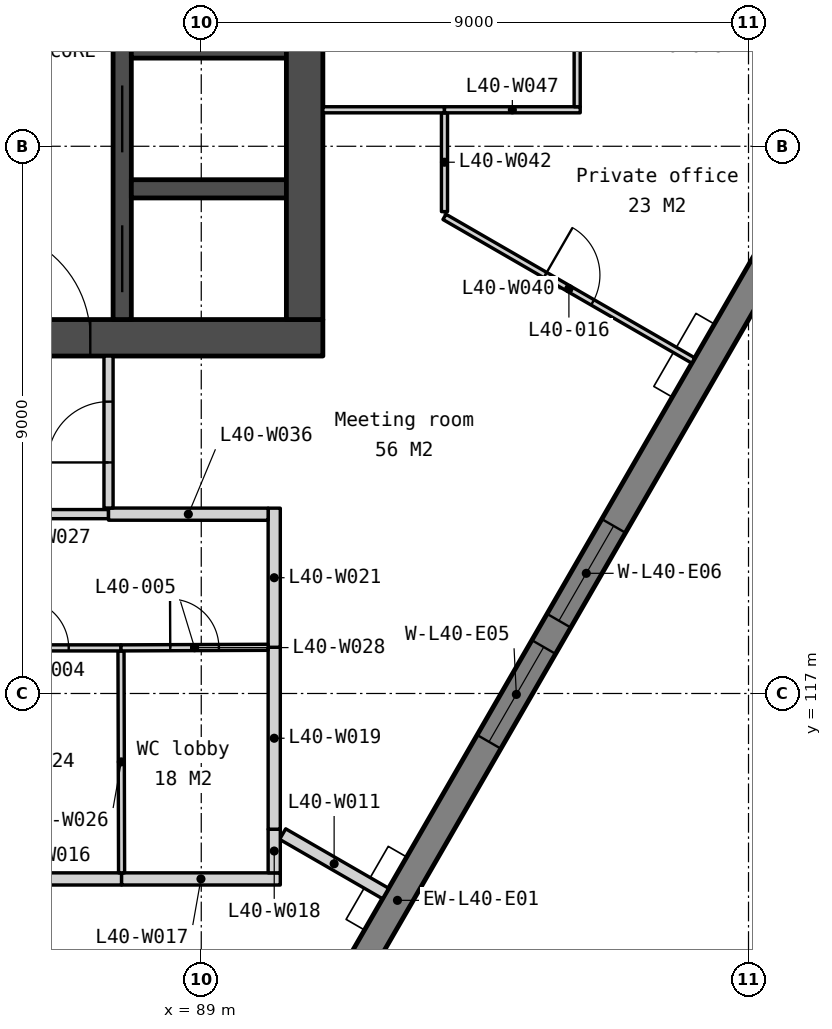
"""IFC4 building model, lengths in metres.
Left out: names, types, materials, properties, quantities, classifications, styles, units other than length and angle.
Written with IfcOpenShell. Run it as: python <this file> out.ifc"""

import sys

from ifc_helpers import new_model, si_unit, direction, frame, frame_2d, origin, place, context, subcontext, project, spatial, polyline, rectangle, outline, extrude, element, fill, save


model = new_model("IFC4")
c1 = context("Model", 3, precision=1e-05, world=origin(), true_north=direction((0.0, 1.0)))
c2 = subcontext(c1, "Body", "Model", "MODEL_VIEW")
j1 = project(units=[si_unit("LENGTHUNIT", "METRE"), si_unit("PLANEANGLEUNIT", "RADIAN")], contexts=[c1])
p1 = place(None, origin())
s1 = spatial("IfcSite", under=j1, at=p1, CompositionType="ELEMENT")
p2 = place(p1, origin())
s2 = spatial("IfcBuilding", under=s1, at=p2, CompositionType="ELEMENT")
p3 = place(p2, frame((0.0, 0.0, 159.8)))
s3 = spatial("IfcBuildingStorey", under=s2, at=p3, CompositionType="ELEMENT", Elevation=159.8)
p4 = place(p3, frame((69.0, 122.85, 0.0), z_axis=(0.0, 0.0, 1.0), x_axis=(1.0, 0.0, 0.0)))
e1 = element("IfcWall", 1, at=p4, inside=s3, PredefinedType="SOLIDWALL", context=c2, shape_type="SweptSolid", body=[
    extrude(rectangle(XDim=22.0, YDim=0.6, at=frame_2d((11.0, 0.0))), origin(), (0.0, 0.0, 1.0), 3.75),
])
p5 = place(p4, frame((16.375, 0.0, 0.0)))
e2 = element("IfcOpeningElement", 2, at=p5, cuts=e1, PredefinedType="OPENING", context=c2, shape_type="SweptSolid", body=[
    extrude(rectangle(XDim=1.8, YDim=2.1, at=frame_2d((0.9, 1.05))), frame((0.0, 0.31, 0.0), z_axis=(0.0, -1.0, 0.0), x_axis=(1.0, 0.0, 0.0)), (0.0, 0.0, 1.0), 0.62),
])
p6 = place(p4, frame((3.825, 0.0, 0.0)))
e3 = element("IfcOpeningElement", 3, at=p6, cuts=e1, PredefinedType="OPENING", context=c2, shape_type="SweptSolid", body=[
    extrude(rectangle(XDim=1.8, YDim=2.1, at=frame_2d((0.9, 1.05))), frame((0.0, 0.31, 0.0), z_axis=(0.0, -1.0, 0.0), x_axis=(1.0, 0.0, 0.0)), (0.0, 0.0, 1.0), 0.62),
])
p7 = place(p4, frame((12.85, 0.0, 0.0)))
e4 = element("IfcOpeningElement", 4, at=p7, cuts=e1, PredefinedType="OPENING", context=c2, shape_type="SweptSolid", body=[
    extrude(rectangle(XDim=1.5, YDim=2.1, at=frame_2d((0.75, 1.05))), frame((0.0, 0.31, 0.0), z_axis=(0.0, -1.0, 0.0), x_axis=(1.0, 0.0, 0.0)), (0.0, 0.0, 1.0), 0.62),
])
p8 = place(p3, frame((87.7, 133.95, 0.0), z_axis=(0.0, 0.0, 1.0), x_axis=(0.0, -1.0, 0.0)))
e5 = element("IfcWall", 5, at=p8, inside=s3, PredefinedType="SOLIDWALL", context=c2, shape_type="SweptSolid", body=[
    extrude(rectangle(XDim=10.8, YDim=0.3, at=frame_2d((5.4, 0.0))), origin(), (0.0, 0.0, 1.0), 3.75),
])
p9 = place(p8, frame((6.95, 0.0, 0.0)))
e6 = element("IfcOpeningElement", 6, at=p9, cuts=e5, PredefinedType="OPENING", context=c2, shape_type="SweptSolid", body=[
    extrude(rectangle(XDim=1.1, YDim=2.1, at=frame_2d((0.55, 1.05))), frame((0.0, 0.16, 0.0), z_axis=(0.0, -1.0, 0.0), x_axis=(1.0, 0.0, 0.0)), (0.0, 0.0, 1.0), 0.32),
])
p10 = place(p8, frame((5.1, 0.0, 0.0)))
e7 = element("IfcOpeningElement", 7, at=p10, cuts=e5, PredefinedType="OPENING", context=c2, shape_type="SweptSolid", body=[
    extrude(rectangle(XDim=1.0, YDim=2.1, at=frame_2d((0.5, 1.05))), frame((0.0, 0.16, 0.0), z_axis=(0.0, -1.0, 0.0), x_axis=(1.0, 0.0, 0.0)), (0.0, 0.0, 1.0), 0.32),
])
p11 = place(p8, frame((9.25, 0.0, 0.0)))
e8 = element("IfcOpeningElement", 8, at=p11, cuts=e5, PredefinedType="OPENING", context=c2, shape_type="SweptSolid", body=[
    extrude(rectangle(XDim=1.1, YDim=2.1, at=frame_2d((0.55, 1.05))), frame((0.0, 0.16, 0.0), z_axis=(0.0, -1.0, 0.0), x_axis=(1.0, 0.0, 0.0)), (0.0, 0.0, 1.0), 0.32),
])
for number, where, z_axis, x_axis in (
    (9, (87.85, 127.6, 0.0), (0.0, 0.0, 1.0), (1.0, 0.0, 0.0)),
    (10, (87.85, 125.3, 0.0), (0.0, 0.0, 1.0), (1.0, 0.0, 0.0)),
):
    element("IfcWall", number, at=place(p3, frame(where, z_axis=z_axis, x_axis=x_axis)), inside=s3, PredefinedType="SOLIDWALL", context=c2, shape_type="SweptSolid", body=[
        extrude(rectangle(XDim=2.55, YDim=0.3, at=frame_2d((1.275, 0.0))), origin(), (0.0, 0.0, 1.0), 3.75),
    ])
p12 = place(p3, frame((90.7, 133.95, 0.0), z_axis=(0.0, 0.0, 1.0), x_axis=(0.0, -1.0, 0.0)))
e11 = element("IfcWall", 11, at=p12, inside=s3, PredefinedType="SOLIDWALL", context=c2, shape_type="SweptSolid", body=[
    extrude(rectangle(XDim=10.8, YDim=0.6, at=frame_2d((5.4, 0.0))), origin(), (0.0, 0.0, 1.0), 3.75),
])
p13 = place(p3, frame((82.105, 96.067, -0.15), z_axis=(0.0, 0.0, 1.0), x_axis=(0.499997369791, 0.866026922331, 0.0)))
e12 = element("IfcWall", 12, at=p13, inside=s3, PredefinedType="SOLIDWALL", context=c2, shape_type="SweptSolid", body=[
    extrude(outline(polyline([(40.486, 0.0), (40.486, 3.9), (0.0, 3.9), (0.0, 0.0), (40.486, 0.0)])), frame((0.0, 0.225, 0.0), z_axis=(0.0, -1.0, 0.0), x_axis=(1.0, 0.0, 0.0)), (0.0, 0.0, 1.0), 0.45),
])
p14 = place(p13, frame((3.011, 0.0, 0.95)))
e13 = element("IfcOpeningElement", 13, at=p14, cuts=e12, PredefinedType="OPENING", context=c2, shape_type="SweptSolid", body=[
    extrude(rectangle(XDim=1.8, YDim=2.2, at=frame_2d((0.9, 1.1))), frame((0.0, 0.235, 0.0), z_axis=(0.0, -1.0, 0.0), x_axis=(1.0, 0.0, 0.0)), (0.0, 0.0, 1.0), 0.47),
])
p15 = place(p13, frame((5.311, 0.0, 0.95)))
e14 = element("IfcOpeningElement", 14, at=p15, cuts=e12, PredefinedType="OPENING", context=c2, shape_type="SweptSolid", body=[
    extrude(rectangle(XDim=1.8, YDim=2.2, at=frame_2d((0.9, 1.1))), frame((0.0, 0.235, 0.0), z_axis=(0.0, -1.0, 0.0), x_axis=(1.0, 0.0, 0.0)), (0.0, 0.0, 1.0), 0.47),
])
p16 = place(p13, frame((13.132, 0.0, 0.95)))
e15 = element("IfcOpeningElement", 15, at=p16, cuts=e12, PredefinedType="OPENING", context=c2, shape_type="SweptSolid", body=[
    extrude(rectangle(XDim=1.8, YDim=2.2, at=frame_2d((0.9, 1.1))), frame((0.0, 0.235, 0.0), z_axis=(0.0, -1.0, 0.0), x_axis=(1.0, 0.0, 0.0)), (0.0, 0.0, 1.0), 0.47),
])
p17 = place(p13, frame((15.432, 0.0, 0.95)))
e16 = element("IfcOpeningElement", 16, at=p17, cuts=e12, PredefinedType="OPENING", context=c2, shape_type="SweptSolid", body=[
    extrude(rectangle(XDim=1.8, YDim=2.2, at=frame_2d((0.9, 1.1))), frame((0.0, 0.235, 0.0), z_axis=(0.0, -1.0, 0.0), x_axis=(1.0, 0.0, 0.0)), (0.0, 0.0, 1.0), 0.47),
])
p18 = place(p13, frame((23.254, 0.0, 0.95)))
e17 = element("IfcOpeningElement", 17, at=p18, cuts=e12, PredefinedType="OPENING", context=c2, shape_type="SweptSolid", body=[
    extrude(rectangle(XDim=1.8, YDim=2.2, at=frame_2d((0.9, 1.1))), frame((0.0, 0.235, 0.0), z_axis=(0.0, -1.0, 0.0), x_axis=(1.0, 0.0, 0.0)), (0.0, 0.0, 1.0), 0.47),
])
p19 = place(p13, frame((25.554, 0.0, 0.95)))
e18 = element("IfcOpeningElement", 18, at=p19, cuts=e12, PredefinedType="OPENING", context=c2, shape_type="SweptSolid", body=[
    extrude(rectangle(XDim=1.8, YDim=2.2, at=frame_2d((0.9, 1.1))), frame((0.0, 0.235, 0.0), z_axis=(0.0, -1.0, 0.0), x_axis=(1.0, 0.0, 0.0)), (0.0, 0.0, 1.0), 0.47),
])
p20 = place(p13, frame((33.375, 0.0, 0.95)))
e19 = element("IfcOpeningElement", 19, at=p20, cuts=e12, PredefinedType="OPENING", context=c2, shape_type="SweptSolid", body=[
    extrude(rectangle(XDim=1.8, YDim=2.2, at=frame_2d((0.9, 1.1))), frame((0.0, 0.235, 0.0), z_axis=(0.0, -1.0, 0.0), x_axis=(1.0, 0.0, 0.0)), (0.0, 0.0, 1.0), 0.47),
])
p21 = place(p13, frame((35.675, 0.0, 0.95)))
e20 = element("IfcOpeningElement", 20, at=p21, cuts=e12, PredefinedType="OPENING", context=c2, shape_type="SweptSolid", body=[
    extrude(rectangle(XDim=1.8, YDim=2.2, at=frame_2d((0.9, 1.1))), frame((0.0, 0.235, 0.0), z_axis=(0.0, -1.0, 0.0), x_axis=(1.0, 0.0, 0.0)), (0.0, 0.0, 1.0), 0.47),
])
p22 = place(p3, frame((82.66, 113.278, 0.0), z_axis=(0.0, 0.0, 1.0), x_axis=(0.866013180616, -0.500021170551, 0.0)))
e21 = element("IfcWall", 21, at=p22, inside=s3, PredefinedType="PARTITIONING", context=c2, shape_type="SweptSolid", body=[
    extrude(rectangle(XDim=7.9, YDim=0.1, at=frame_2d((3.95, 0.0))), origin(), (0.0, 0.0, 1.0), 3.75),
])
p23 = place(p22, frame((3.5, 0.0, 0.0)))
e22 = element("IfcOpeningElement", 22, at=p23, cuts=e21, PredefinedType="OPENING", context=c2, shape_type="SweptSolid", body=[
    extrude(rectangle(XDim=0.9, YDim=2.1, at=frame_2d((0.45, 1.05))), frame((0.0, 0.06, 0.0), z_axis=(0.0, -1.0, 0.0), x_axis=(1.0, 0.0, 0.0)), (0.0, 0.0, 1.0), 0.12),
])
p24 = place(p3, frame((90.339, 114.688, 0.0), z_axis=(0.0, 0.0, 1.0), x_axis=(0.866021300503, -0.500007107024, 0.0)))
e23 = element("IfcWall", 23, at=p24, inside=s3, PredefinedType="PARTITIONING", context=c2, shape_type="SweptSolid", body=[
    extrude(rectangle(XDim=1.955, YDim=0.2, at=frame_2d((0.978, 0.0))), origin(), (0.0, 0.0, 1.0), 3.75),
])
p25 = place(p3, frame((85.15, 113.95, 0.0), z_axis=(0.0, 0.0, 1.0), x_axis=(1.0, 0.0, 0.0)))
e24 = element("IfcWall", 24, at=p25, inside=s3, PredefinedType="PARTITIONING", context=c2, shape_type="SweptSolid", body=[
    extrude(rectangle(XDim=2.54, YDim=0.2, at=frame_2d((1.27, 0.0))), origin(), (0.0, 0.0, 1.0), 3.75),
])
p26 = place(p3, frame((87.69, 113.95, 0.0), z_axis=(0.0, 0.0, 1.0), x_axis=(1.0, 0.0, 0.0)))
e25 = element("IfcWall", 25, at=p26, inside=s3, PredefinedType="PARTITIONING", context=c2, shape_type="SweptSolid", body=[
    extrude(rectangle(XDim=2.61, YDim=0.2, at=frame_2d((1.305, 0.0))), origin(), (0.0, 0.0, 1.0), 3.75),
])
p27 = place(p3, frame((90.2, 114.05, 0.0), z_axis=(0.0, 0.0, 1.0), x_axis=(0.0, 1.0, 0.0)))
e26 = element("IfcWall", 26, at=p27, inside=s3, PredefinedType="PARTITIONING", context=c2, shape_type="SweptSolid", body=[
    extrude(rectangle(XDim=0.718, YDim=0.2, at=frame_2d((0.359, 0.0))), origin(), (0.0, 0.0, 1.0), 3.75),
])
p28 = place(p3, frame((90.2, 114.768, 0.0), z_axis=(0.0, 0.0, 1.0), x_axis=(0.0, 1.0, 0.0)))
e27 = element("IfcWall", 27, at=p28, inside=s3, PredefinedType="PARTITIONING", context=c2, shape_type="SweptSolid", body=[
    extrude(rectangle(XDim=2.992, YDim=0.2, at=frame_2d((1.496, 0.0))), origin(), (0.0, 0.0, 1.0), 3.75),
])
p29 = place(p3, frame((90.2, 117.76, 0.0), z_axis=(0.0, 0.0, 1.0), x_axis=(0.0, 1.0, 0.0)))
e28 = element("IfcWall", 28, at=p29, inside=s3, PredefinedType="PARTITIONING", context=c2, shape_type="SweptSolid", body=[
    extrude(rectangle(XDim=2.288, YDim=0.2, at=frame_2d((1.144, 0.0))), origin(), (0.0, 0.0, 1.0), 3.75),
])
p30 = place(p3, frame((87.69, 114.05, 0.0), z_axis=(0.0, 0.0, 1.0), x_axis=(-0.002608686776, 0.999996597371, 0.0)))
e29 = element("IfcWall", 29, at=p30, inside=s3, PredefinedType="PARTITIONING", context=c2, shape_type="SweptSolid", body=[
    extrude(rectangle(XDim=3.65, YDim=0.1, at=frame_2d((1.825, 0.0))), origin(), (0.0, 0.0, 1.0), 3.75),
])
p31 = place(p3, frame((85.16, 117.75, 0.0), z_axis=(0.0, 0.0, 1.0), x_axis=(1.0, 0.0, 0.0)))
e30 = element("IfcWall", 30, at=p31, inside=s3, PredefinedType="PARTITIONING", context=c2, shape_type="SweptSolid", body=[
    extrude(rectangle(XDim=2.52, YDim=0.1, at=frame_2d((1.26, 0.0))), origin(), (0.0, 0.0, 1.0), 3.75),
])
p32 = place(p31, frame((0.86, 0.0, 0.0)))
e31 = element("IfcOpeningElement", 31, at=p32, cuts=e30, PredefinedType="OPENING", context=c2, shape_type="SweptSolid", body=[
    extrude(rectangle(XDim=0.8, YDim=2.1, at=frame_2d((0.4, 1.05))), frame((0.0, 0.06, 0.0), z_axis=(0.0, -1.0, 0.0), x_axis=(1.0, 0.0, 0.0)), (0.0, 0.0, 1.0), 0.12),
])
p33 = place(p3, frame((87.68, 117.75, 0.0), z_axis=(0.0, 0.0, 1.0), x_axis=(0.999992261016, 0.003934197335, 0.0)))
e32 = element("IfcWall", 32, at=p33, inside=s3, PredefinedType="PARTITIONING", context=c2, shape_type="SweptSolid", body=[
    extrude(rectangle(XDim=2.42, YDim=0.1, at=frame_2d((1.21, 0.0))), origin(), (0.0, 0.0, 1.0), 3.75),
])
p34 = place(p33, frame((0.81, 0.0, 0.0)))
e33 = element("IfcOpeningElement", 33, at=p34, cuts=e32, PredefinedType="OPENING", context=c2, shape_type="SweptSolid", body=[
    extrude(rectangle(XDim=0.8, YDim=2.1, at=frame_2d((0.4, 1.05))), frame((0.0, 0.06, 0.0), z_axis=(0.0, -1.0, 0.0), x_axis=(1.0, 0.0, 0.0)), (0.0, 0.0, 1.0), 0.12),
])
p35 = place(p3, frame((81.2, 119.95, 0.0), z_axis=(0.0, 0.0, 1.0), x_axis=(1.0, 0.0, 0.0)))
e34 = element("IfcWall", 34, at=p35, inside=s3, PredefinedType="PARTITIONING", context=c2, shape_type="SweptSolid", body=[
    extrude(rectangle(XDim=6.275, YDim=0.15, at=frame_2d((3.138, 0.0))), origin(), (0.0, 0.0, 1.0), 3.75),
])
p36 = place(p35, frame((2.637, 0.0, 0.0)))
e35 = element("IfcOpeningElement", 35, at=p36, cuts=e34, PredefinedType="OPENING", context=c2, shape_type="SweptSolid", body=[
    extrude(rectangle(XDim=1.0, YDim=2.1, at=frame_2d((0.5, 1.05))), frame((0.0, 0.085, 0.0), z_axis=(0.0, -1.0, 0.0), x_axis=(1.0, 0.0, 0.0)), (0.0, 0.0, 1.0), 0.17),
])
p37 = place(p3, frame((87.475, 119.95, 0.0), z_axis=(0.0, 0.0, 1.0), x_axis=(0.999999723197, -0.000744047413, 0.0)))
e36 = element("IfcWall", 36, at=p37, inside=s3, PredefinedType="PARTITIONING", context=c2, shape_type="SweptSolid", body=[
    extrude(rectangle(XDim=2.625, YDim=0.2, at=frame_2d((1.312, 0.0))), origin(), (0.0, 0.0, 1.0), 3.75),
])
p38 = place(p3, frame((93.0, 124.839, 0.0), z_axis=(0.0, 0.0, 1.0), x_axis=(0.866028145587, -0.499995251029, 0.0)))
e37 = element("IfcWall", 37, at=p38, inside=s3, PredefinedType="PARTITIONING", context=c2, shape_type="SweptSolid", body=[
    extrude(rectangle(XDim=4.726, YDim=0.1, at=frame_2d((2.363, 0.0))), origin(), (0.0, 0.0, 1.0), 3.75),
])
p39 = place(p38, frame((1.913, 0.0, 0.0)))
e38 = element("IfcOpeningElement", 38, at=p39, cuts=e37, PredefinedType="OPENING", context=c2, shape_type="SweptSolid", body=[
    extrude(rectangle(XDim=0.9, YDim=2.1, at=frame_2d((0.45, 1.05))), frame((0.0, 0.06, 0.0), z_axis=(0.0, -1.0, 0.0), x_axis=(1.0, 0.0, 0.0)), (0.0, 0.0, 1.0), 0.12),
])
p40 = place(p3, frame((87.475, 120.05, 0.0), z_axis=(0.0, 0.0, 1.0), x_axis=(0.0, 1.0, 0.0)))
e39 = element("IfcWall", 39, at=p40, inside=s3, PredefinedType="PARTITIONING", context=c2, shape_type="SweptSolid", body=[
    extrude(rectangle(XDim=2.5, YDim=0.15, at=frame_2d((1.25, 0.0))), origin(), (0.0, 0.0, 1.0), 3.75),
])
p41 = place(p40, frame((0.75, 0.0, 0.0)))
e40 = element("IfcOpeningElement", 40, at=p41, cuts=e39, PredefinedType="OPENING", context=c2, shape_type="SweptSolid", body=[
    extrude(rectangle(XDim=1.0, YDim=2.1, at=frame_2d((0.5, 1.05))), frame((0.0, 0.085, 0.0), z_axis=(0.0, -1.0, 0.0), x_axis=(1.0, 0.0, 0.0)), (0.0, 0.0, 1.0), 0.17),
])
p42 = place(p3, frame((93.0, 124.925, 0.0), z_axis=(0.0, 0.0, 1.0), x_axis=(0.0, 1.0, 0.0)))
e41 = element("IfcWall", 41, at=p42, inside=s3, PredefinedType="PARTITIONING", context=c2, shape_type="SweptSolid", body=[
    extrude(rectangle(XDim=1.625, YDim=0.1, at=frame_2d((0.812, 0.0))), origin(), (0.0, 0.0, 1.0), 3.75),
])
p43 = place(p3, frame((91.0, 126.6, 0.0), z_axis=(0.0, 0.0, 1.0), x_axis=(1.0, 0.0, 0.0)))
e42 = element("IfcWall", 42, at=p43, inside=s3, PredefinedType="PARTITIONING", context=c2, shape_type="SweptSolid", body=[
    extrude(rectangle(XDim=2.0, YDim=0.1, at=frame_2d((1.0, 0.0))), origin(), (0.0, 0.0, 1.0), 3.75),
])
p44 = place(p3, frame((93.0, 126.6, 0.0), z_axis=(0.0, 0.0, 1.0), x_axis=(1.0, 0.0, 0.0)))
e43 = element("IfcWall", 43, at=p44, inside=s3, PredefinedType="PARTITIONING", context=c2, shape_type="SweptSolid", body=[
    extrude(rectangle(XDim=2.232, YDim=0.1, at=frame_2d((1.116, 0.0))), origin(), (0.0, 0.0, 1.0), 3.75),
])
p45 = place(p3, frame((95.182, 126.65, 0.0), z_axis=(0.0, 0.0, 1.0), x_axis=(0.0, 1.0, 0.0)))
e44 = element("IfcWall", 44, at=p45, inside=s3, PredefinedType="PARTITIONING", context=c2, shape_type="SweptSolid", body=[
    extrude(rectangle(XDim=2.772, YDim=0.1, at=frame_2d((1.386, 0.0))), origin(), (0.0, 0.0, 1.0), 3.75),
])
p46 = place(p3, frame((95.243, 129.387, 0.0), z_axis=(0.0, 0.0, 1.0), x_axis=(0.866030444867, -0.499991268487, 0.0)))
e45 = element("IfcWall", 45, at=p46, inside=s3, PredefinedType="PARTITIONING", context=c2, shape_type="SweptSolid", body=[
    extrude(rectangle(XDim=5.058, YDim=0.1, at=frame_2d((2.529, 0.0))), origin(), (0.0, 0.0, 1.0), 3.75),
])
p47 = place(p46, frame((2.079, 0.0, 0.0)))
e46 = element("IfcOpeningElement", 46, at=p47, cuts=e45, PredefinedType="OPENING", context=c2, shape_type="SweptSolid", body=[
    extrude(rectangle(XDim=0.9, YDim=2.1, at=frame_2d((0.45, 1.05))), frame((0.0, 0.06, 0.0), z_axis=(0.0, -1.0, 0.0), x_axis=(1.0, 0.0, 0.0)), (0.0, 0.0, 1.0), 0.12),
])
p48 = place(p9, origin())
e47 = element("IfcDoor", 47, at=p48, inside=s3, OperationType="SLIDING_TO_LEFT", PredefinedType="DOOR", context=c2, shape_type="SweptSolid", body=[
    extrude(rectangle(XDim=1.1, YDim=2.1, at=frame_2d((0.55, 1.05))), frame((0.0, 0.025, 0.0), z_axis=(0.0, -1.0, 0.0), x_axis=(1.0, 0.0, 0.0)), (0.0, 0.0, 1.0), 0.05),
])
fill(e6, e47)
p49 = place(p5, origin())
e48 = element("IfcDoor", 48, at=p49, inside=s3, OperationType="DOUBLE_DOOR_DOUBLE_SWING", PredefinedType="DOOR", context=c2, shape_type="SweptSolid", body=[
    extrude(rectangle(XDim=1.8, YDim=2.1, at=frame_2d((0.9, 1.05))), frame((0.0, 0.025, 0.0), z_axis=(0.0, -1.0, 0.0), x_axis=(1.0, 0.0, 0.0)), (0.0, 0.0, 1.0), 0.05),
])
fill(e2, e48)
p50 = place(p11, origin())
e49 = element("IfcDoor", 49, at=p50, inside=s3, OperationType="SLIDING_TO_LEFT", PredefinedType="DOOR", context=c2, shape_type="SweptSolid", body=[
    extrude(rectangle(XDim=1.1, YDim=2.1, at=frame_2d((0.55, 1.05))), frame((0.0, 0.025, 0.0), z_axis=(0.0, -1.0, 0.0), x_axis=(1.0, 0.0, 0.0)), (0.0, 0.0, 1.0), 0.05),
])
fill(e8, e49)
p51 = place(p18, origin())
e50 = element("IfcWindow", 50, at=p51, inside=s3, PartitioningType="SINGLE_PANEL", PredefinedType="WINDOW", context=c2, shape_type="SweptSolid", body=[
    extrude(rectangle(XDim=1.8, YDim=2.2, at=frame_2d((0.9, 1.1))), frame((0.0, 0.03, 0.0), z_axis=(0.0, -1.0, 0.0), x_axis=(1.0, 0.0, 0.0)), (0.0, 0.0, 1.0), 0.06),
])
fill(e17, e50)
p52 = place(p19, origin())
e51 = element("IfcWindow", 51, at=p52, inside=s3, PartitioningType="SINGLE_PANEL", PredefinedType="WINDOW", context=c2, shape_type="SweptSolid", body=[
    extrude(rectangle(XDim=1.8, YDim=2.2, at=frame_2d((0.9, 1.1))), frame((0.0, 0.03, 0.0), z_axis=(0.0, -1.0, 0.0), x_axis=(1.0, 0.0, 0.0)), (0.0, 0.0, 1.0), 0.06),
])
fill(e18, e51)
p53 = place(p32, origin())
e52 = element("IfcDoor", 52, at=p53, inside=s3, OperationType="SINGLE_SWING_LEFT", PredefinedType="DOOR", context=c2, shape_type="SweptSolid", body=[
    extrude(rectangle(XDim=0.8, YDim=2.1, at=frame_2d((0.4, 1.05))), frame((0.0, 0.025, 0.0), z_axis=(0.0, -1.0, 0.0), x_axis=(1.0, 0.0, 0.0)), (0.0, 0.0, 1.0), 0.05),
])
fill(e31, e52)
p54 = place(p34, origin())
e53 = element("IfcDoor", 53, at=p54, inside=s3, OperationType="SINGLE_SWING_LEFT", PredefinedType="DOOR", context=c2, shape_type="SweptSolid", body=[
    extrude(rectangle(XDim=0.8, YDim=2.1, at=frame_2d((0.4, 1.05))), frame((0.0, 0.025, 0.0), z_axis=(0.0, -1.0, 0.0), x_axis=(1.0, 0.0, 0.0)), (0.0, 0.0, 1.0), 0.05),
])
fill(e33, e53)
p55 = place(p41, origin())
e54 = element("IfcDoor", 54, at=p55, inside=s3, OperationType="SINGLE_SWING_LEFT", PredefinedType="DOOR", context=c2, shape_type="SweptSolid", body=[
    extrude(rectangle(XDim=1.0, YDim=2.1, at=frame_2d((0.5, 1.05))), frame((0.0, 0.025, 0.0), z_axis=(0.0, -1.0, 0.0), x_axis=(1.0, 0.0, 0.0)), (0.0, 0.0, 1.0), 0.05),
])
fill(e40, e54)
p56 = place(p39, origin())
e55 = element("IfcDoor", 55, at=p56, inside=s3, OperationType="SINGLE_SWING_LEFT", PredefinedType="DOOR", context=c2, shape_type="SweptSolid", body=[
    extrude(rectangle(XDim=0.9, YDim=2.1, at=frame_2d((0.45, 1.05))), frame((0.0, 0.025, 0.0), z_axis=(0.0, -1.0, 0.0), x_axis=(1.0, 0.0, 0.0)), (0.0, 0.0, 1.0), 0.05),
])
fill(e38, e55)
save(model, sys.argv[1])
